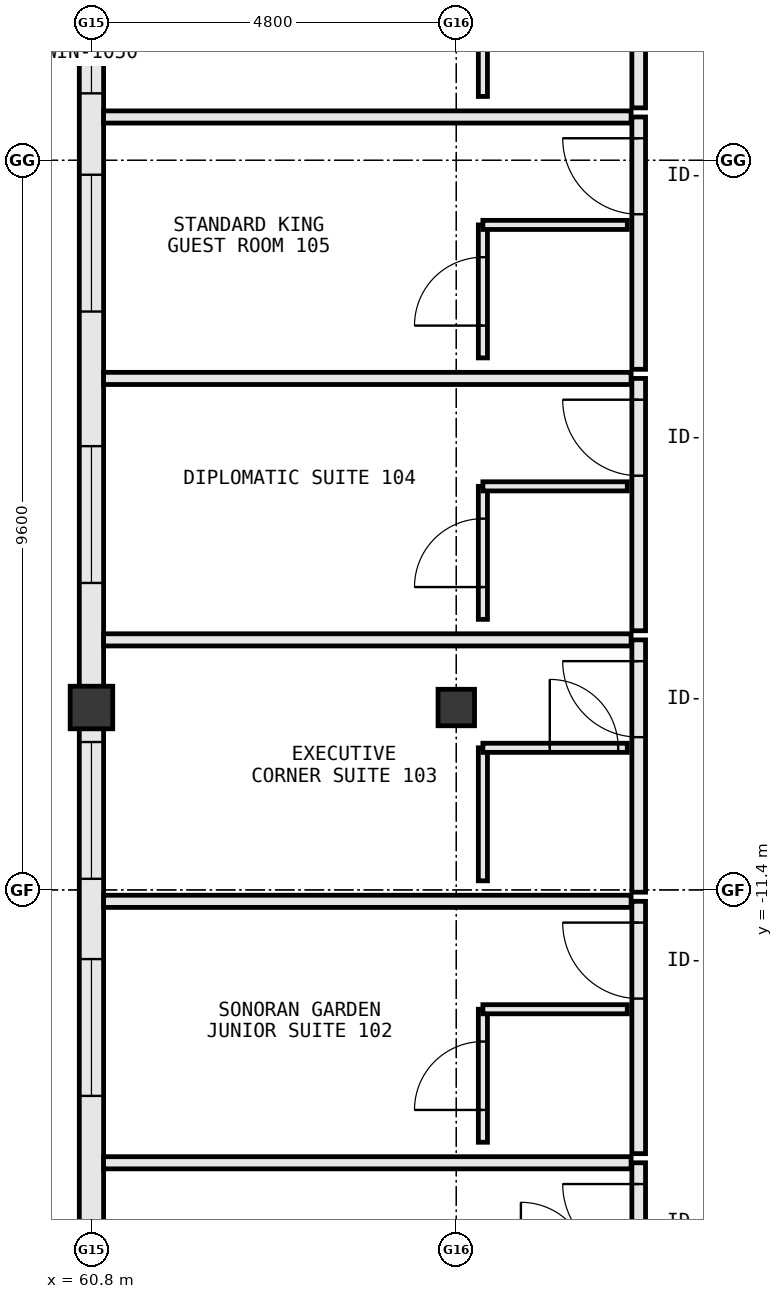
"""IFC4 building model, lengths in metres.
Left out: names, types, materials, properties, quantities, classifications, styles, units other than length and angle.
Written with IfcOpenShell. Run it as: python <this file> out.ifc"""

import sys

from ifc_helpers import new_model, si_unit, direction, frame, frame_2d, origin, origin_2d, place, context, subcontext, project, spatial, rectangle, extrude, element, fill, save


model = new_model("IFC4")
c1 = context("Model", 3, precision=1e-05, world=origin(), true_north=direction((0.0, 1.0)))
c2 = subcontext(c1, "Body", "Model", "MODEL_VIEW")
j1 = project(units=[si_unit("LENGTHUNIT", "METRE"), si_unit("PLANEANGLEUNIT", "RADIAN")], contexts=[c1])
p1 = place(None, origin())
s1 = spatial("IfcSite", under=j1, at=p1, CompositionType="ELEMENT")
p2 = place(p1, origin())
s2 = spatial("IfcBuilding", under=s1, at=p2, CompositionType="ELEMENT")
p3 = place(p2, frame((0.0, 0.0, 20.0)))
s3 = spatial("IfcBuildingStorey", under=s2, at=p3, CompositionType="ELEMENT", Elevation=20.0)
p4 = place(p3, frame((60.8, -9.0, 0.0), z_axis=(0.0, 0.0, 1.0), x_axis=(1.0, 0.0, 0.0)))
e1 = element("IfcColumn", 1, at=p4, inside=s3, PredefinedType="COLUMN", context=c2, shape_type="SweptSolid", body=[
    extrude(rectangle(XDim=0.56, YDim=0.56, at=origin_2d()), origin(), (0.0, 0.0, 1.0), 3.8),
])
p5 = place(p3, frame((65.6, -9.0, 0.0), z_axis=(0.0, 0.0, 1.0), x_axis=(1.0, 0.0, 0.0)))
e2 = element("IfcColumn", 2, at=p5, inside=s3, PredefinedType="COLUMN", context=c2, shape_type="SweptSolid", body=[
    extrude(rectangle(XDim=0.48, YDim=0.48, at=origin_2d()), origin(), (0.0, 0.0, 1.0), 3.8),
])
p6 = place(p3, frame((60.8, 0.322, 0.0), z_axis=(0.0, 0.0, 1.0), x_axis=(0.0, -1.0, 0.0)))
e3 = element("IfcWall", 3, at=p6, inside=s3, PredefinedType="STANDARD", context=c2, shape_type="SweptSolid", body=[
    extrude(rectangle(XDim=9.044, YDim=0.32, at=frame_2d((4.522, 0.0))), origin(), (0.0, 0.0, 1.0), 2.905),
])
p7 = place(p6, frame((5.883, 0.0, 0.85)))
e4 = element("IfcOpeningElement", 4, at=p7, cuts=e3, PredefinedType="OPENING", context=c2, shape_type="SweptSolid", body=[
    extrude(rectangle(XDim=1.8, YDim=1.85, at=frame_2d((0.9, 0.925))), frame((0.0, 0.172, 0.0), z_axis=(0.0, -1.0, 0.0), x_axis=(1.0, 0.0, 0.0)), (0.0, 0.0, 1.0), 0.344),
])
p8 = place(p6, frame((2.312, 0.0, 0.85)))
e5 = element("IfcOpeningElement", 5, at=p8, cuts=e3, PredefinedType="OPENING", context=c2, shape_type="SweptSolid", body=[
    extrude(rectangle(XDim=1.8, YDim=1.85, at=frame_2d((0.9, 0.925))), frame((0.0, 0.172, 0.0), z_axis=(0.0, -1.0, 0.0), x_axis=(1.0, 0.0, 0.0)), (0.0, 0.0, 1.0), 0.344),
])
p9 = place(p6, frame((0.191, 0.0, 0.85)))
e6 = element("IfcOpeningElement", 6, at=p9, cuts=e3, PredefinedType="OPENING", context=c2, shape_type="SweptSolid", body=[
    extrude(rectangle(XDim=1.05, YDim=1.45, at=frame_2d((0.525, 0.725))), frame((0.0, 0.172, 0.0), z_axis=(0.0, -1.0, 0.0), x_axis=(1.0, 0.0, 0.0)), (0.0, 0.0, 1.0), 0.344),
])
p10 = place(p3, frame((60.8, -9.278, 0.0), z_axis=(0.0, 0.0, 1.0), x_axis=(0.0, -1.0, 0.0)))
e7 = element("IfcWall", 7, at=p10, inside=s3, PredefinedType="STANDARD", context=c2, shape_type="SweptSolid", body=[
    extrude(rectangle(XDim=9.044, YDim=0.32, at=frame_2d((4.522, 0.0))), origin(), (0.0, 0.0, 1.0), 2.905),
])
p11 = place(p10, frame((6.472, 0.0, 0.85)))
e8 = element("IfcOpeningElement", 8, at=p11, cuts=e7, PredefinedType="OPENING", context=c2, shape_type="SweptSolid", body=[
    extrude(rectangle(XDim=1.8, YDim=1.85, at=frame_2d((0.9, 0.925))), frame((0.0, 0.172, 0.0), z_axis=(0.0, -1.0, 0.0), x_axis=(1.0, 0.0, 0.0)), (0.0, 0.0, 1.0), 0.344),
])
p12 = place(p10, frame((3.032, 0.0, 0.85)))
e9 = element("IfcOpeningElement", 9, at=p12, cuts=e7, PredefinedType="OPENING", context=c2, shape_type="SweptSolid", body=[
    extrude(rectangle(XDim=1.8, YDim=1.85, at=frame_2d((0.9, 0.925))), frame((0.0, 0.172, 0.0), z_axis=(0.0, -1.0, 0.0), x_axis=(1.0, 0.0, 0.0)), (0.0, 0.0, 1.0), 0.344),
])
p13 = place(p10, frame((0.176, 0.0, 0.85)))
e10 = element("IfcOpeningElement", 10, at=p13, cuts=e7, PredefinedType="OPENING", context=c2, shape_type="SweptSolid", body=[
    extrude(rectangle(XDim=1.8, YDim=1.85, at=frame_2d((0.9, 0.925))), frame((0.0, 0.172, 0.0), z_axis=(0.0, -1.0, 0.0), x_axis=(1.0, 0.0, 0.0)), (0.0, 0.0, 1.0), 0.344),
])
p14 = place(p3, frame((68.0, -18.31, 0.0), z_axis=(0.0, 0.0, 1.0), x_axis=(0.0, 1.0, 0.0)))
e11 = element("IfcWall", 11, at=p14, inside=s3, PredefinedType="PARTITIONING", context=c2, shape_type="SweptSolid", body=[
    extrude(rectangle(XDim=3.32, YDim=0.18, at=frame_2d((1.66, 0.0))), origin(), (0.0, 0.0, 1.0), 3.55),
])
p15 = place(p14, frame((2.04, 0.0, 0.0)))
e12 = element("IfcOpeningElement", 12, at=p15, cuts=e11, PredefinedType="OPENING", context=c2, shape_type="SweptSolid", body=[
    extrude(rectangle(XDim=1.0, YDim=2.2, at=frame_2d((0.5, 1.1))), frame((0.0, 0.102, 0.0), z_axis=(0.0, -1.0, 0.0), x_axis=(1.0, 0.0, 0.0)), (0.0, 0.0, 1.0), 0.204),
])
p16 = place(p3, frame((60.96, -14.99, 0.0), z_axis=(0.0, 0.0, 1.0), x_axis=(1.0, 0.0, 0.0)))
e13 = element("IfcWall", 13, at=p16, inside=s3, PredefinedType="PARTITIONING", context=c2, shape_type="SweptSolid", body=[
    extrude(rectangle(XDim=6.94, YDim=0.16, at=frame_2d((3.47, 0.0))), origin(), (0.0, 0.0, 1.0), 3.55),
])
p17 = place(p3, frame((68.0, -14.87, 0.0), z_axis=(0.0, 0.0, 1.0), x_axis=(0.0, 1.0, 0.0)))
e14 = element("IfcWall", 14, at=p17, inside=s3, PredefinedType="PARTITIONING", context=c2, shape_type="SweptSolid", body=[
    extrude(rectangle(XDim=3.32, YDim=0.18, at=frame_2d((1.66, 0.0))), origin(), (0.0, 0.0, 1.0), 3.55),
])
p18 = place(p17, frame((2.04, 0.0, 0.0)))
e15 = element("IfcOpeningElement", 15, at=p18, cuts=e14, PredefinedType="OPENING", context=c2, shape_type="SweptSolid", body=[
    extrude(rectangle(XDim=1.0, YDim=2.2, at=frame_2d((0.5, 1.1))), frame((0.0, 0.102, 0.0), z_axis=(0.0, -1.0, 0.0), x_axis=(1.0, 0.0, 0.0)), (0.0, 0.0, 1.0), 0.204),
])
p19 = place(p3, frame((60.96, -11.55, 0.0), z_axis=(0.0, 0.0, 1.0), x_axis=(1.0, 0.0, 0.0)))
e16 = element("IfcWall", 16, at=p19, inside=s3, PredefinedType="PARTITIONING", context=c2, shape_type="SweptSolid", body=[
    extrude(rectangle(XDim=6.94, YDim=0.16, at=frame_2d((3.47, 0.0))), origin(), (0.0, 0.0, 1.0), 3.55),
])
p20 = place(p3, frame((65.95, -14.72, 0.0), z_axis=(0.0, 0.0, 1.0), x_axis=(0.0, 1.0, 0.0)))
e17 = element("IfcWall", 17, at=p20, inside=s3, PredefinedType="PARTITIONING", context=c2, shape_type="SweptSolid", body=[
    extrude(rectangle(XDim=1.75, YDim=0.12, at=frame_2d((0.875, 0.0))), origin(), (0.0, 0.0, 1.0), 2.905),
])
p21 = place(p20, frame((0.425, 0.0, 0.0)))
e18 = element("IfcOpeningElement", 18, at=p21, cuts=e17, PredefinedType="OPENING", context=c2, shape_type="SweptSolid", body=[
    extrude(rectangle(XDim=0.9, YDim=2.15, at=frame_2d((0.45, 1.075))), frame((0.0, 0.072, 0.0), z_axis=(0.0, -1.0, 0.0), x_axis=(1.0, 0.0, 0.0)), (0.0, 0.0, 1.0), 0.144),
])
p22 = place(p3, frame((65.95, -12.97, 0.0), z_axis=(0.0, 0.0, 1.0), x_axis=(1.0, 0.0, 0.0)))
e19 = element("IfcWall", 19, at=p22, inside=s3, PredefinedType="PARTITIONING", context=c2, shape_type="SweptSolid", body=[
    extrude(rectangle(XDim=1.9, YDim=0.12, at=frame_2d((0.95, 0.0))), origin(), (0.0, 0.0, 1.0), 3.55),
])
p23 = place(p3, frame((68.0, -11.43, 0.0), z_axis=(0.0, 0.0, 1.0), x_axis=(0.0, 1.0, 0.0)))
e20 = element("IfcWall", 20, at=p23, inside=s3, PredefinedType="PARTITIONING", context=c2, shape_type="SweptSolid", body=[
    extrude(rectangle(XDim=3.32, YDim=0.18, at=frame_2d((1.66, 0.0))), origin(), (0.0, 0.0, 1.0), 3.55),
])
p24 = place(p23, frame((2.04, 0.0, 0.0)))
e21 = element("IfcOpeningElement", 21, at=p24, cuts=e20, PredefinedType="OPENING", context=c2, shape_type="SweptSolid", body=[
    extrude(rectangle(XDim=1.0, YDim=2.2, at=frame_2d((0.5, 1.1))), frame((0.0, 0.102, 0.0), z_axis=(0.0, -1.0, 0.0), x_axis=(1.0, 0.0, 0.0)), (0.0, 0.0, 1.0), 0.204),
])
p25 = place(p3, frame((60.96, -8.11, 0.0), z_axis=(0.0, 0.0, 1.0), x_axis=(1.0, 0.0, 0.0)))
e22 = element("IfcWall", 22, at=p25, inside=s3, PredefinedType="PARTITIONING", context=c2, shape_type="SweptSolid", body=[
    extrude(rectangle(XDim=6.94, YDim=0.16, at=frame_2d((3.47, 0.0))), origin(), (0.0, 0.0, 1.0), 3.55),
])
p26 = place(p3, frame((65.95, -11.28, 0.0), z_axis=(0.0, 0.0, 1.0), x_axis=(0.0, 1.0, 0.0)))
e23 = element("IfcWall", 23, at=p26, inside=s3, PredefinedType="PARTITIONING", context=c2, shape_type="SweptSolid", body=[
    extrude(rectangle(XDim=1.75, YDim=0.12, at=frame_2d((0.875, 0.0))), origin(), (0.0, 0.0, 1.0), 2.905),
])
p27 = place(p3, frame((65.95, -9.53, 0.0), z_axis=(0.0, 0.0, 1.0), x_axis=(1.0, 0.0, 0.0)))
e24 = element("IfcWall", 24, at=p27, inside=s3, PredefinedType="PARTITIONING", context=c2, shape_type="SweptSolid", body=[
    extrude(rectangle(XDim=1.9, YDim=0.12, at=frame_2d((0.95, 0.0))), origin(), (0.0, 0.0, 1.0), 3.55),
])
p28 = place(p27, frame((0.88, 0.0, 0.0)))
e25 = element("IfcOpeningElement", 25, at=p28, cuts=e24, PredefinedType="OPENING", context=c2, shape_type="SweptSolid", body=[
    extrude(rectangle(XDim=0.9, YDim=2.15, at=frame_2d((0.45, 1.075))), frame((0.0, 0.072, 0.0), z_axis=(0.0, -1.0, 0.0), x_axis=(1.0, 0.0, 0.0)), (0.0, 0.0, 1.0), 0.144),
])
p29 = place(p3, frame((68.0, -7.99, 0.0), z_axis=(0.0, 0.0, 1.0), x_axis=(0.0, 1.0, 0.0)))
e26 = element("IfcWall", 26, at=p29, inside=s3, PredefinedType="PARTITIONING", context=c2, shape_type="SweptSolid", body=[
    extrude(rectangle(XDim=3.32, YDim=0.18, at=frame_2d((1.66, 0.0))), origin(), (0.0, 0.0, 1.0), 3.55),
])
p30 = place(p29, frame((2.04, 0.0, 0.0)))
e27 = element("IfcOpeningElement", 27, at=p30, cuts=e26, PredefinedType="OPENING", context=c2, shape_type="SweptSolid", body=[
    extrude(rectangle(XDim=1.0, YDim=2.2, at=frame_2d((0.5, 1.1))), frame((0.0, 0.102, 0.0), z_axis=(0.0, -1.0, 0.0), x_axis=(1.0, 0.0, 0.0)), (0.0, 0.0, 1.0), 0.204),
])
p31 = place(p3, frame((60.96, -4.67, 0.0), z_axis=(0.0, 0.0, 1.0), x_axis=(1.0, 0.0, 0.0)))
e28 = element("IfcWall", 28, at=p31, inside=s3, PredefinedType="PARTITIONING", context=c2, shape_type="SweptSolid", body=[
    extrude(rectangle(XDim=6.94, YDim=0.16, at=frame_2d((3.47, 0.0))), origin(), (0.0, 0.0, 1.0), 3.55),
])
p32 = place(p3, frame((65.95, -7.84, 0.0), z_axis=(0.0, 0.0, 1.0), x_axis=(0.0, 1.0, 0.0)))
e29 = element("IfcWall", 29, at=p32, inside=s3, PredefinedType="PARTITIONING", context=c2, shape_type="SweptSolid", body=[
    extrude(rectangle(XDim=1.75, YDim=0.12, at=frame_2d((0.875, 0.0))), origin(), (0.0, 0.0, 1.0), 2.905),
])
p33 = place(p32, frame((0.425, 0.0, 0.0)))
e30 = element("IfcOpeningElement", 30, at=p33, cuts=e29, PredefinedType="OPENING", context=c2, shape_type="SweptSolid", body=[
    extrude(rectangle(XDim=0.9, YDim=2.15, at=frame_2d((0.45, 1.075))), frame((0.0, 0.072, 0.0), z_axis=(0.0, -1.0, 0.0), x_axis=(1.0, 0.0, 0.0)), (0.0, 0.0, 1.0), 0.144),
])
p34 = place(p3, frame((65.95, -6.09, 0.0), z_axis=(0.0, 0.0, 1.0), x_axis=(1.0, 0.0, 0.0)))
e31 = element("IfcWall", 31, at=p34, inside=s3, PredefinedType="PARTITIONING", context=c2, shape_type="SweptSolid", body=[
    extrude(rectangle(XDim=1.9, YDim=0.12, at=frame_2d((0.95, 0.0))), origin(), (0.0, 0.0, 1.0), 3.55),
])
p35 = place(p3, frame((68.0, -4.55, 0.0), z_axis=(0.0, 0.0, 1.0), x_axis=(0.0, 1.0, 0.0)))
e32 = element("IfcWall", 32, at=p35, inside=s3, PredefinedType="PARTITIONING", context=c2, shape_type="SweptSolid", body=[
    extrude(rectangle(XDim=3.32, YDim=0.18, at=frame_2d((1.66, 0.0))), origin(), (0.0, 0.0, 1.0), 3.55),
])
p36 = place(p35, frame((2.04, 0.0, 0.0)))
e33 = element("IfcOpeningElement", 33, at=p36, cuts=e32, PredefinedType="OPENING", context=c2, shape_type="SweptSolid", body=[
    extrude(rectangle(XDim=1.0, YDim=2.2, at=frame_2d((0.5, 1.1))), frame((0.0, 0.102, 0.0), z_axis=(0.0, -1.0, 0.0), x_axis=(1.0, 0.0, 0.0)), (0.0, 0.0, 1.0), 0.204),
])
p37 = place(p3, frame((60.96, -1.23, 0.0), z_axis=(0.0, 0.0, 1.0), x_axis=(1.0, 0.0, 0.0)))
e34 = element("IfcWall", 34, at=p37, inside=s3, PredefinedType="PARTITIONING", context=c2, shape_type="SweptSolid", body=[
    extrude(rectangle(XDim=6.94, YDim=0.16, at=frame_2d((3.47, 0.0))), origin(), (0.0, 0.0, 1.0), 3.55),
])
p38 = place(p3, frame((65.95, -4.4, 0.0), z_axis=(0.0, 0.0, 1.0), x_axis=(0.0, 1.0, 0.0)))
e35 = element("IfcWall", 35, at=p38, inside=s3, PredefinedType="PARTITIONING", context=c2, shape_type="SweptSolid", body=[
    extrude(rectangle(XDim=1.75, YDim=0.12, at=frame_2d((0.875, 0.0))), origin(), (0.0, 0.0, 1.0), 2.905),
])
p39 = place(p38, frame((0.425, 0.0, 0.0)))
e36 = element("IfcOpeningElement", 36, at=p39, cuts=e35, PredefinedType="OPENING", context=c2, shape_type="SweptSolid", body=[
    extrude(rectangle(XDim=0.9, YDim=2.15, at=frame_2d((0.45, 1.075))), frame((0.0, 0.072, 0.0), z_axis=(0.0, -1.0, 0.0), x_axis=(1.0, 0.0, 0.0)), (0.0, 0.0, 1.0), 0.144),
])
p40 = place(p3, frame((65.95, -2.65, 0.0), z_axis=(0.0, 0.0, 1.0), x_axis=(1.0, 0.0, 0.0)))
e37 = element("IfcWall", 37, at=p40, inside=s3, PredefinedType="PARTITIONING", context=c2, shape_type="SweptSolid", body=[
    extrude(rectangle(XDim=1.9, YDim=0.12, at=frame_2d((0.95, 0.0))), origin(), (0.0, 0.0, 1.0), 3.55),
])
p41 = place(p3, frame((68.0, -1.11, 0.0), z_axis=(0.0, 0.0, 1.0), x_axis=(0.0, 1.0, 0.0)))
e38 = element("IfcWall", 38, at=p41, inside=s3, PredefinedType="PARTITIONING", context=c2, shape_type="SweptSolid", body=[
    extrude(rectangle(XDim=3.32, YDim=0.18, at=frame_2d((1.66, 0.0))), origin(), (0.0, 0.0, 1.0), 3.55),
])
p42 = place(p41, frame((2.04, 0.0, 0.0)))
e39 = element("IfcOpeningElement", 39, at=p42, cuts=e38, PredefinedType="OPENING", context=c2, shape_type="SweptSolid", body=[
    extrude(rectangle(XDim=1.0, YDim=2.2, at=frame_2d((0.5, 1.1))), frame((0.0, 0.102, 0.0), z_axis=(0.0, -1.0, 0.0), x_axis=(1.0, 0.0, 0.0)), (0.0, 0.0, 1.0), 0.204),
])
p43 = place(p3, frame((65.95, -0.96, 0.0), z_axis=(0.0, 0.0, 1.0), x_axis=(0.0, 1.0, 0.0)))
e40 = element("IfcWall", 40, at=p43, inside=s3, PredefinedType="PARTITIONING", context=c2, shape_type="SweptSolid", body=[
    extrude(rectangle(XDim=1.75, YDim=0.12, at=frame_2d((0.875, 0.0))), origin(), (0.0, 0.0, 1.0), 2.905),
])
p44 = place(p7, origin())
e41 = element("IfcWindow", 41, at=p44, inside=s3, PartitioningType="SINGLE_PANEL", PredefinedType="WINDOW", context=c2, shape_type="SweptSolid", body=[
    extrude(rectangle(XDim=1.8, YDim=1.85, at=frame_2d((0.9, 0.925))), frame((0.0, 0.03, 0.0), z_axis=(0.0, -1.0, 0.0), x_axis=(1.0, 0.0, 0.0)), (0.0, 0.0, 1.0), 0.06),
])
fill(e4, e41)
p45 = place(p12, origin())
e42 = element("IfcWindow", 42, at=p45, inside=s3, PartitioningType="SINGLE_PANEL", PredefinedType="WINDOW", context=c2, shape_type="SweptSolid", body=[
    extrude(rectangle(XDim=1.8, YDim=1.85, at=frame_2d((0.9, 0.925))), frame((0.0, 0.03, 0.0), z_axis=(0.0, -1.0, 0.0), x_axis=(1.0, 0.0, 0.0)), (0.0, 0.0, 1.0), 0.06),
])
fill(e9, e42)
p46 = place(p13, origin())
e43 = element("IfcWindow", 43, at=p46, inside=s3, PartitioningType="SINGLE_PANEL", PredefinedType="WINDOW", context=c2, shape_type="SweptSolid", body=[
    extrude(rectangle(XDim=1.8, YDim=1.85, at=frame_2d((0.9, 0.925))), frame((0.0, 0.03, 0.0), z_axis=(0.0, -1.0, 0.0), x_axis=(1.0, 0.0, 0.0)), (0.0, 0.0, 1.0), 0.06),
])
fill(e10, e43)
p47 = place(p8, origin())
e44 = element("IfcWindow", 44, at=p47, inside=s3, PartitioningType="SINGLE_PANEL", PredefinedType="WINDOW", context=c2, shape_type="SweptSolid", body=[
    extrude(rectangle(XDim=1.8, YDim=1.85, at=frame_2d((0.9, 0.925))), frame((0.0, 0.03, 0.0), z_axis=(0.0, -1.0, 0.0), x_axis=(1.0, 0.0, 0.0)), (0.0, 0.0, 1.0), 0.06),
])
fill(e5, e44)
p48 = place(p9, origin())
e45 = element("IfcWindow", 45, at=p48, inside=s3, PartitioningType="SINGLE_PANEL", PredefinedType="WINDOW", context=c2, shape_type="SweptSolid", body=[
    extrude(rectangle(XDim=1.05, YDim=1.45, at=frame_2d((0.525, 0.725))), frame((0.0, 0.03, 0.0), z_axis=(0.0, -1.0, 0.0), x_axis=(1.0, 0.0, 0.0)), (0.0, 0.0, 1.0), 0.06),
])
fill(e6, e45)
p49 = place(p15, origin())
e46 = element("IfcDoor", 46, at=p49, inside=s3, OperationType="SINGLE_SWING_RIGHT", PredefinedType="DOOR", context=c2, shape_type="SweptSolid", body=[
    extrude(rectangle(XDim=1.0, YDim=2.2, at=frame_2d((0.5, 1.1))), frame((0.0, 0.025, 0.0), z_axis=(0.0, -1.0, 0.0), x_axis=(1.0, 0.0, 0.0)), (0.0, 0.0, 1.0), 0.05),
])
fill(e12, e46)
p50 = place(p18, origin())
e47 = element("IfcDoor", 47, at=p50, inside=s3, OperationType="SINGLE_SWING_RIGHT", PredefinedType="DOOR", context=c2, shape_type="SweptSolid", body=[
    extrude(rectangle(XDim=1.0, YDim=2.2, at=frame_2d((0.5, 1.1))), frame((0.0, 0.025, 0.0), z_axis=(0.0, -1.0, 0.0), x_axis=(1.0, 0.0, 0.0)), (0.0, 0.0, 1.0), 0.05),
])
fill(e15, e47)
p51 = place(p21, origin())
e48 = element("IfcDoor", 48, at=p51, inside=s3, OperationType="SINGLE_SWING_LEFT", PredefinedType="DOOR", context=c2, shape_type="SweptSolid", body=[
    extrude(rectangle(XDim=0.9, YDim=2.15, at=frame_2d((0.45, 1.075))), frame((0.0, 0.025, 0.0), z_axis=(0.0, -1.0, 0.0), x_axis=(1.0, 0.0, 0.0)), (0.0, 0.0, 1.0), 0.05),
])
fill(e18, e48)
p52 = place(p24, origin())
e49 = element("IfcDoor", 49, at=p52, inside=s3, OperationType="SINGLE_SWING_RIGHT", PredefinedType="DOOR", context=c2, shape_type="SweptSolid", body=[
    extrude(rectangle(XDim=1.0, YDim=2.2, at=frame_2d((0.5, 1.1))), frame((0.0, 0.025, 0.0), z_axis=(0.0, -1.0, 0.0), x_axis=(1.0, 0.0, 0.0)), (0.0, 0.0, 1.0), 0.05),
])
fill(e21, e49)
p53 = place(p28, origin())
e50 = element("IfcDoor", 50, at=p53, inside=s3, OperationType="SINGLE_SWING_LEFT", PredefinedType="DOOR", context=c2, shape_type="SweptSolid", body=[
    extrude(rectangle(XDim=0.9, YDim=2.15, at=frame_2d((0.45, 1.075))), frame((0.0, 0.025, 0.0), z_axis=(0.0, -1.0, 0.0), x_axis=(1.0, 0.0, 0.0)), (0.0, 0.0, 1.0), 0.05),
])
fill(e25, e50)
p54 = place(p30, origin())
e51 = element("IfcDoor", 51, at=p54, inside=s3, OperationType="SINGLE_SWING_RIGHT", PredefinedType="DOOR", context=c2, shape_type="SweptSolid", body=[
    extrude(rectangle(XDim=1.0, YDim=2.2, at=frame_2d((0.5, 1.1))), frame((0.0, 0.025, 0.0), z_axis=(0.0, -1.0, 0.0), x_axis=(1.0, 0.0, 0.0)), (0.0, 0.0, 1.0), 0.05),
])
fill(e27, e51)
p55 = place(p33, origin())
e52 = element("IfcDoor", 52, at=p55, inside=s3, OperationType="SINGLE_SWING_LEFT", PredefinedType="DOOR", context=c2, shape_type="SweptSolid", body=[
    extrude(rectangle(XDim=0.9, YDim=2.15, at=frame_2d((0.45, 1.075))), frame((0.0, 0.025, 0.0), z_axis=(0.0, -1.0, 0.0), x_axis=(1.0, 0.0, 0.0)), (0.0, 0.0, 1.0), 0.05),
])
fill(e30, e52)
p56 = place(p36, origin())
e53 = element("IfcDoor", 53, at=p56, inside=s3, OperationType="SINGLE_SWING_RIGHT", PredefinedType="DOOR", context=c2, shape_type="SweptSolid", body=[
    extrude(rectangle(XDim=1.0, YDim=2.2, at=frame_2d((0.5, 1.1))), frame((0.0, 0.025, 0.0), z_axis=(0.0, -1.0, 0.0), x_axis=(1.0, 0.0, 0.0)), (0.0, 0.0, 1.0), 0.05),
])
fill(e33, e53)
p57 = place(p39, origin())
e54 = element("IfcDoor", 54, at=p57, inside=s3, OperationType="SINGLE_SWING_LEFT", PredefinedType="DOOR", context=c2, shape_type="SweptSolid", body=[
    extrude(rectangle(XDim=0.9, YDim=2.15, at=frame_2d((0.45, 1.075))), frame((0.0, 0.025, 0.0), z_axis=(0.0, -1.0, 0.0), x_axis=(1.0, 0.0, 0.0)), (0.0, 0.0, 1.0), 0.05),
])
fill(e36, e54)
save(model, sys.argv[1])
